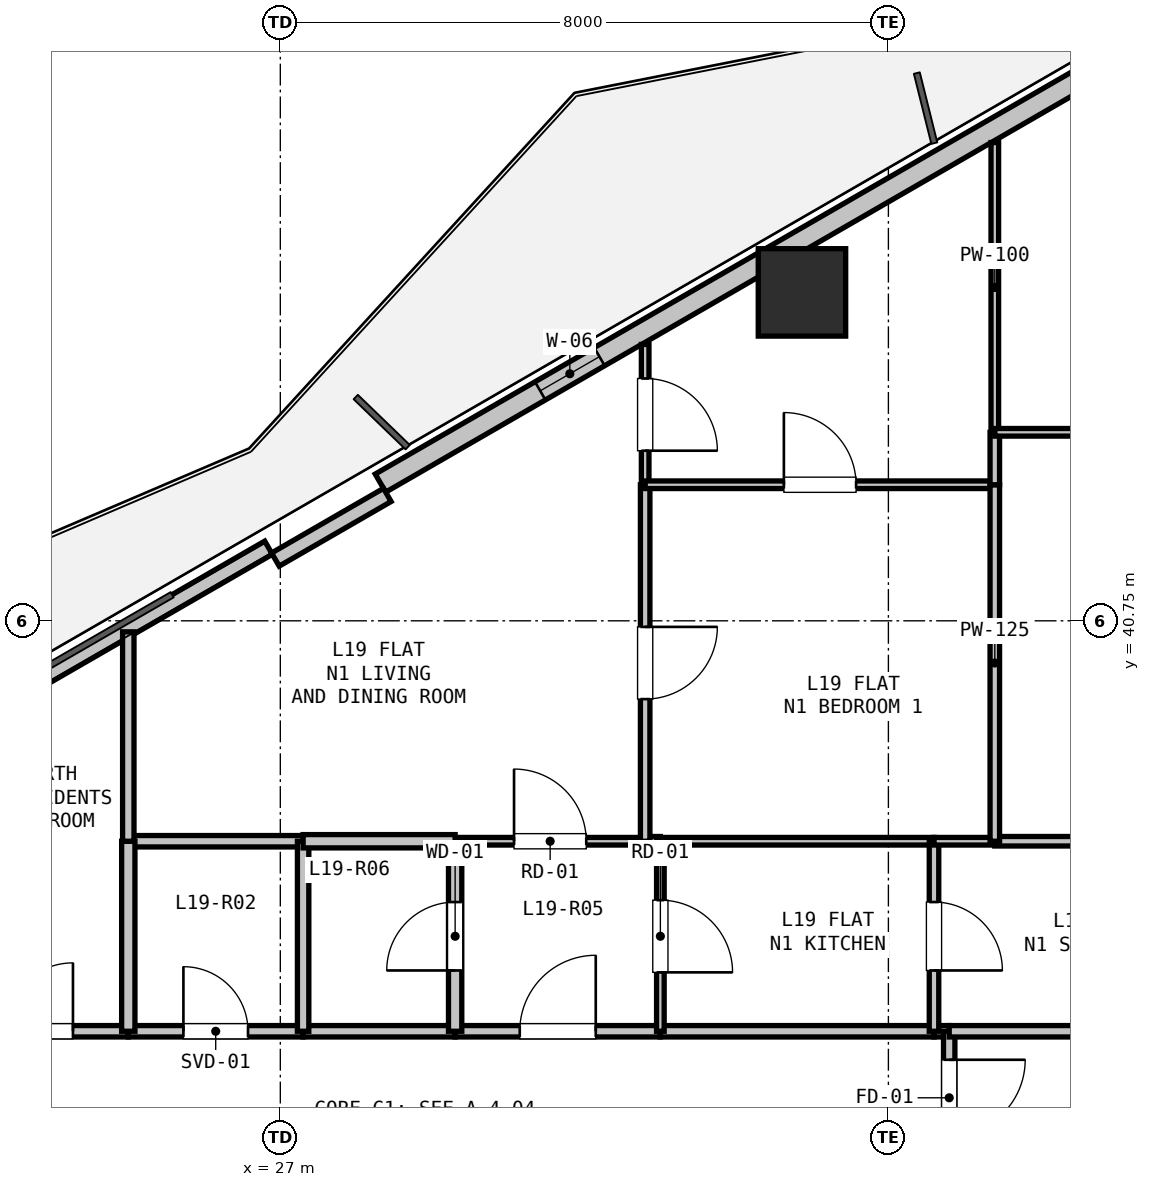
"""IFC4 building model, lengths in metres.
Left out: names, types, materials, properties, quantities, classifications, styles, units other than length and angle.
Written with IfcOpenShell. Run it as: python <this file> out.ifc"""

import sys

from ifc_helpers import new_model, si_unit, direction, frame, frame_2d, origin, origin_2d, place, context, subcontext, project, spatial, rectangle, hollow_rectangle, extrude, element, fill, save


model = new_model("IFC4")
c1 = context("Model", 3, precision=1e-05, world=origin(), true_north=direction((0.0, 1.0)))
c2 = subcontext(c1, "Body", "Model", "MODEL_VIEW")
j1 = project(units=[si_unit("LENGTHUNIT", "METRE"), si_unit("PLANEANGLEUNIT", "RADIAN")], contexts=[c1])
p1 = place(None, origin())
s1 = spatial("IfcSite", under=j1, at=p1, CompositionType="ELEMENT")
p2 = place(p1, origin())
s2 = spatial("IfcBuilding", under=s1, at=p2, CompositionType="ELEMENT")
p3 = place(p2, frame((0.0, 0.0, 73.5)))
s3 = spatial("IfcBuildingStorey", under=s2, at=p3, CompositionType="ELEMENT", Elevation=73.5)
p4 = place(p3, frame((33.863, 45.071, 0.0), z_axis=(0.0, 0.0, 1.0), x_axis=(1.0, 0.0, 0.0)))
e1 = element("IfcColumn", 1, at=p4, inside=s3, PredefinedType="COLUMN", context=c2, shape_type="SweptSolid", body=[
    extrude(hollow_rectangle(XDim=1.15, YDim=1.15, WallThickness=0.032, at=origin_2d()), origin(), (0.0, 0.0, 1.0), 3.3),
])
p5 = place(p3, frame((17.12, 36.097, 0.0), z_axis=(0.0, 0.0, 1.0), x_axis=(0.866027010039, 0.499997217876, 0.0)))
e2 = element("IfcWall", 2, at=p5, inside=s3, PredefinedType="PARAPET", context=c2, shape_type="SweptSolid", body=[
    extrude(rectangle(XDim=11.229, YDim=0.2, at=frame_2d((5.615, 0.0))), origin(), (0.0, 0.0, 1.0), 0.2),
])
p6 = place(p3, frame((28.317, 42.562, 0.0), z_axis=(0.0, 0.0, 1.0), x_axis=(0.866023023012, 0.500004123596, 0.0)))
e3 = element("IfcWall", 3, at=p6, inside=s3, PredefinedType="SOLIDWALL", context=c2, shape_type="SweptSolid", body=[
    extrude(rectangle(XDim=11.93, YDim=0.275, at=frame_2d((5.965, 0.0))), origin(), (0.0, 0.0, 1.0), 2.67),
])
p7 = place(p6, frame((2.427, 0.0, 0.9)))
e4 = element("IfcOpeningElement", 4, at=p7, cuts=e3, PredefinedType="OPENING", context=c2, shape_type="SweptSolid", body=[
    extrude(rectangle(XDim=0.9, YDim=1.4, at=frame_2d((0.45, 0.7))), frame((0.0, 0.147, 0.0), z_axis=(0.0, -1.0, 0.0), x_axis=(1.0, 0.0, 0.0)), (0.0, 0.0, 1.0), 0.295),
])
p8 = place(p3, frame((26.935, 41.556, 0.0), z_axis=(0.0, 0.0, 1.0), x_axis=(0.86605165483, 0.499954529098, 0.0)))
e5 = element("IfcWall", 5, at=p8, inside=s3, PredefinedType="PARAPET", context=c2, shape_type="SweptSolid", body=[
    extrude(rectangle(XDim=1.7, YDim=0.2, at=frame_2d((0.85, 0.0))), origin(), (0.0, 0.0, 1.0), 2.67),
])
p9 = place(p3, frame((19.8, 35.35, 0.0), z_axis=(0.0, 0.0, 1.0), x_axis=(1.0, 0.0, 0.0)))
e6 = element("IfcWall", 6, at=p9, inside=s3, PredefinedType="PARTITIONING", context=c2, shape_type="SweptSolid", body=[
    extrude(rectangle(XDim=5.2, YDim=0.15, at=frame_2d((2.6, 0.0))), origin(), (0.0, 0.0, 1.0), 3.05),
])
p10 = place(p9, frame((2.672, 0.0, 0.0)))
e7 = element("IfcOpeningElement", 7, at=p10, cuts=e6, PredefinedType="OPENING", context=c2, shape_type="SweptSolid", body=[
    extrude(rectangle(XDim=1.8, YDim=2.2, at=frame_2d((0.9, 1.1))), frame((0.0, 0.085, 0.0), z_axis=(0.0, -1.0, 0.0), x_axis=(1.0, 0.0, 0.0)), (0.0, 0.0, 1.0), 0.17),
])
p11 = place(p3, frame((25.0, 35.35, 0.0), z_axis=(0.0, 0.0, 1.0), x_axis=(1.0, 0.0, 0.0)))
e8 = element("IfcWall", 8, at=p11, inside=s3, PredefinedType="PARTITIONING", context=c2, shape_type="SweptSolid", body=[
    extrude(rectangle(XDim=2.3, YDim=0.15, at=frame_2d((1.15, 0.0))), origin(), (0.0, 0.0, 1.0), 3.05),
])
p12 = place(p11, frame((0.725, 0.0, 0.0)))
e9 = element("IfcOpeningElement", 9, at=p12, cuts=e8, PredefinedType="OPENING", context=c2, shape_type="SweptSolid", body=[
    extrude(rectangle(XDim=0.85, YDim=2.1, at=frame_2d((0.425, 1.05))), frame((0.0, 0.085, 0.0), z_axis=(0.0, -1.0, 0.0), x_axis=(1.0, 0.0, 0.0)), (0.0, 0.0, 1.0), 0.17),
])
p13 = place(p3, frame((27.3, 35.35, 0.0), z_axis=(0.0, 0.0, 1.0), x_axis=(1.0, 0.0, 0.0)))
e10 = element("IfcWall", 10, at=p13, inside=s3, PredefinedType="PARTITIONING", context=c2, shape_type="SweptSolid", body=[
    extrude(rectangle(XDim=2.0, YDim=0.15, at=frame_2d((1.0, 0.0))), origin(), (0.0, 0.0, 1.0), 3.05),
])
p14 = place(p3, frame((29.3, 35.35, 0.0), z_axis=(0.0, 0.0, 1.0), x_axis=(1.0, 0.0, 0.0)))
e11 = element("IfcWall", 11, at=p14, inside=s3, PredefinedType="PARTITIONING", context=c2, shape_type="SweptSolid", body=[
    extrude(rectangle(XDim=2.7, YDim=0.15, at=frame_2d((1.35, 0.0))), origin(), (0.0, 0.0, 1.0), 3.05),
])
p15 = place(p14, frame((0.85, 0.0, 0.0)))
e12 = element("IfcOpeningElement", 12, at=p15, cuts=e11, PredefinedType="OPENING", context=c2, shape_type="SweptSolid", body=[
    extrude(rectangle(XDim=1.0, YDim=2.15, at=frame_2d((0.5, 1.075))), frame((0.0, 0.085, 0.0), z_axis=(0.0, -1.0, 0.0), x_axis=(1.0, 0.0, 0.0)), (0.0, 0.0, 1.0), 0.17),
])
p16 = place(p3, frame((32.0, 35.35, 0.0), z_axis=(0.0, 0.0, 1.0), x_axis=(1.0, 0.0, 0.0)))
e13 = element("IfcWall", 13, at=p16, inside=s3, PredefinedType="PARTITIONING", context=c2, shape_type="SweptSolid", body=[
    extrude(rectangle(XDim=3.6, YDim=0.15, at=frame_2d((1.8, 0.0))), origin(), (0.0, 0.0, 1.0), 3.05),
])
p17 = place(p3, frame((35.6, 35.35, 0.0), z_axis=(0.0, 0.0, 1.0), x_axis=(1.0, 0.0, 0.0)))
e14 = element("IfcWall", 14, at=p17, inside=s3, PredefinedType="PARTITIONING", context=c2, shape_type="SweptSolid", body=[
    extrude(rectangle(XDim=0.2, YDim=0.15, at=frame_2d((0.1, 0.0))), origin(), (0.0, 0.0, 1.0), 3.05),
])
p18 = place(p3, frame((35.8, 35.35, 0.0), z_axis=(0.0, 0.0, 1.0), x_axis=(0.0, -1.0, 0.0)))
e15 = element("IfcWall", 15, at=p18, inside=s3, PredefinedType="PARTITIONING", context=c2, shape_type="SweptSolid", body=[
    extrude(rectangle(XDim=1.75, YDim=0.15, at=frame_2d((0.875, 0.0))), origin(), (0.0, 0.0, 1.0), 3.05),
])
p19 = place(p18, frame((0.375, 0.0, 0.0)))
e16 = element("IfcOpeningElement", 16, at=p19, cuts=e15, PredefinedType="OPENING", context=c2, shape_type="SweptSolid", body=[
    extrude(rectangle(XDim=1.0, YDim=2.15, at=frame_2d((0.5, 1.075))), frame((0.0, 0.085, 0.0), z_axis=(0.0, -1.0, 0.0), x_axis=(1.0, 0.0, 0.0)), (0.0, 0.0, 1.0), 0.17),
])
p20 = place(p3, frame((35.8, 35.35, 0.0), z_axis=(0.0, 0.0, 1.0), x_axis=(1.0, 0.0, 0.0)))
e17 = element("IfcWall", 17, at=p20, inside=s3, PredefinedType="PARTITIONING", context=c2, shape_type="SweptSolid", body=[
    extrude(rectangle(XDim=2.6, YDim=0.15, at=frame_2d((1.3, 0.0))), origin(), (0.0, 0.0, 1.0), 2.423),
])
p21 = place(p3, frame((29.3, 37.85, 0.0), z_axis=(0.0, 0.0, 1.0), x_axis=(1.0, 0.0, 0.0)))
e18 = element("IfcWall", 18, at=p21, inside=s3, PredefinedType="PARTITIONING", context=c2, shape_type="SweptSolid", body=[
    extrude(rectangle(XDim=2.5, YDim=0.1, at=frame_2d((1.25, 0.0))), origin(), (0.0, 0.0, 1.0), 3.05),
])
p22 = place(p21, frame((0.775, 0.0, 0.0)))
e19 = element("IfcOpeningElement", 19, at=p22, cuts=e18, PredefinedType="OPENING", context=c2, shape_type="SweptSolid", body=[
    extrude(rectangle(XDim=0.95, YDim=2.1, at=frame_2d((0.475, 1.05))), frame((0.0, 0.06, 0.0), z_axis=(0.0, -1.0, 0.0), x_axis=(1.0, 0.0, 0.0)), (0.0, 0.0, 1.0), 0.12),
])
p23 = place(p3, frame((31.8, 37.85, 0.0), z_axis=(0.0, 0.0, 1.0), x_axis=(1.0, 0.0, 0.0)))
e20 = element("IfcWall", 20, at=p23, inside=s3, PredefinedType="PARTITIONING", context=c2, shape_type="SweptSolid", body=[
    extrude(rectangle(XDim=0.2, YDim=0.125, at=frame_2d((0.1, 0.0))), origin(), (0.0, 0.0, 1.0), 3.05),
])
p24 = place(p3, frame((32.0, 37.85, 0.0), z_axis=(0.0, 0.0, 1.0), x_axis=(0.0, -1.0, 0.0)))
e21 = element("IfcWall", 21, at=p24, inside=s3, PredefinedType="PARTITIONING", context=c2, shape_type="SweptSolid", body=[
    extrude(rectangle(XDim=2.5, YDim=0.1, at=frame_2d((1.25, 0.0))), origin(), (0.0, 0.0, 1.0), 3.05),
])
p25 = place(p24, frame((0.775, 0.0, 0.0)))
e22 = element("IfcOpeningElement", 22, at=p25, cuts=e21, PredefinedType="OPENING", context=c2, shape_type="SweptSolid", body=[
    extrude(rectangle(XDim=0.95, YDim=2.1, at=frame_2d((0.475, 1.05))), frame((0.0, 0.06, 0.0), z_axis=(0.0, -1.0, 0.0), x_axis=(1.0, 0.0, 0.0)), (0.0, 0.0, 1.0), 0.12),
])
p26 = place(p3, frame((29.3, 35.35, 0.0), z_axis=(0.0, 0.0, 1.0), x_axis=(0.0, 1.0, 0.0)))
e23 = element("IfcWall", 23, at=p26, inside=s3, PredefinedType="PLUMBINGWALL", context=c2, shape_type="SweptSolid", body=[
    extrude(rectangle(XDim=2.5, YDim=0.175, at=frame_2d((1.25, 0.0))), origin(), (0.0, 0.0, 1.0), 3.05),
])
p27 = place(p26, frame((0.8, 0.0, 0.0)))
e24 = element("IfcOpeningElement", 24, at=p27, cuts=e23, PredefinedType="OPENING", context=c2, shape_type="SweptSolid", body=[
    extrude(rectangle(XDim=0.9, YDim=2.1, at=frame_2d((0.45, 1.05))), frame((0.0, 0.097, 0.0), z_axis=(0.0, -1.0, 0.0), x_axis=(1.0, 0.0, 0.0)), (0.0, 0.0, 1.0), 0.195),
])
p28 = place(p3, frame((25.0, 37.85, 0.0), z_axis=(0.0, 0.0, 1.0), x_axis=(1.0, 0.0, 0.0)))
e25 = element("IfcWall", 25, at=p28, inside=s3, PredefinedType="PARTITIONING", context=c2, shape_type="SweptSolid", body=[
    extrude(rectangle(XDim=2.3, YDim=0.15, at=frame_2d((1.15, 0.0))), origin(), (0.0, 0.0, 1.0), 3.05),
])
p29 = place(p3, frame((27.3, 37.85, 0.0), z_axis=(0.0, 0.0, 1.0), x_axis=(0.0, -1.0, 0.0)))
e26 = element("IfcWall", 26, at=p29, inside=s3, PredefinedType="PARTITIONING", context=c2, shape_type="SweptSolid", body=[
    extrude(rectangle(XDim=2.5, YDim=0.15, at=frame_2d((1.25, 0.0))), origin(), (0.0, 0.0, 1.0), 3.05),
])
p30 = place(p3, frame((25.0, 35.35, 0.0), z_axis=(0.0, 0.0, 1.0), x_axis=(0.0, 1.0, 0.0)))
e27 = element("IfcWall", 27, at=p30, inside=s3, PredefinedType="PLUMBINGWALL", context=c2, shape_type="SweptSolid", body=[
    extrude(rectangle(XDim=2.5, YDim=0.175, at=frame_2d((1.25, 0.0))), origin(), (0.0, 0.0, 1.0), 3.05),
])
p31 = place(p3, frame((27.3, 37.85, 0.0), z_axis=(0.0, 0.0, 1.0), x_axis=(1.0, 0.0, 0.0)))
e28 = element("IfcWall", 28, at=p31, inside=s3, PredefinedType="PLUMBINGWALL", context=c2, shape_type="SweptSolid", body=[
    extrude(rectangle(XDim=2.0, YDim=0.175, at=frame_2d((1.0, 0.0))), origin(), (0.0, 0.0, 1.0), 3.05),
])
p32 = place(p3, frame((32.0, 37.85, 0.0), z_axis=(0.0, 0.0, 1.0), x_axis=(1.0, 0.0, 0.0)))
e29 = element("IfcWall", 29, at=p32, inside=s3, PredefinedType="PARTITIONING", context=c2, shape_type="SweptSolid", body=[
    extrude(rectangle(XDim=3.6, YDim=0.1, at=frame_2d((1.8, 0.0))), origin(), (0.0, 0.0, 1.0), 3.05),
])
p33 = place(p3, frame((35.6, 37.85, 0.0), z_axis=(0.0, 0.0, 1.0), x_axis=(0.0, -1.0, 0.0)))
e30 = element("IfcWall", 30, at=p33, inside=s3, PredefinedType="PARTITIONING", context=c2, shape_type="SweptSolid", body=[
    extrude(rectangle(XDim=2.5, YDim=0.125, at=frame_2d((1.25, 0.0))), origin(), (0.0, 0.0, 1.0), 3.05),
])
p34 = place(p33, frame((0.8, 0.0, 0.0)))
e31 = element("IfcOpeningElement", 31, at=p34, cuts=e30, PredefinedType="OPENING", context=c2, shape_type="SweptSolid", body=[
    extrude(rectangle(XDim=0.9, YDim=2.1, at=frame_2d((0.45, 1.05))), frame((0.0, 0.073, 0.0), z_axis=(0.0, -1.0, 0.0), x_axis=(1.0, 0.0, 0.0)), (0.0, 0.0, 1.0), 0.145),
])
p35 = place(p3, frame((25.0, 40.605, 0.0), z_axis=(0.0, 0.0, 1.0), x_axis=(0.0, -1.0, 0.0)))
e32 = element("IfcWall", 32, at=p35, inside=s3, PredefinedType="PARTITIONING", context=c2, shape_type="SweptSolid", body=[
    extrude(rectangle(XDim=2.755, YDim=0.15, at=frame_2d((1.377, 0.0))), origin(), (0.0, 0.0, 1.0), 2.365),
])
p36 = place(p3, frame((35.6, 37.85, 0.0), z_axis=(0.0, 0.0, 1.0), x_axis=(1.0, 0.0, 0.0)))
e33 = element("IfcWall", 33, at=p36, inside=s3, PredefinedType="PARTITIONING", context=c2, shape_type="SweptSolid", body=[
    extrude(rectangle(XDim=0.8, YDim=0.1, at=frame_2d((0.4, 0.0))), origin(), (0.0, 0.0, 1.0), 3.05),
])
p37 = place(p3, frame((36.4, 37.85, 0.0), z_axis=(0.0, 0.0, 1.0), x_axis=(1.0, 0.0, 0.0)))
e34 = element("IfcWall", 34, at=p37, inside=s3, PredefinedType="PARTITIONING", context=c2, shape_type="SweptSolid", body=[
    extrude(rectangle(XDim=6.473, YDim=0.125, at=frame_2d((3.237, 0.0))), origin(), (0.0, 0.0, 1.0), 2.365),
])
p38 = place(p37, frame((2.762, 0.0, 0.0)))
e35 = element("IfcOpeningElement", 35, at=p38, cuts=e34, PredefinedType="OPENING", context=c2, shape_type="SweptSolid", body=[
    extrude(rectangle(XDim=0.95, YDim=2.1, at=frame_2d((0.475, 1.05))), frame((0.0, 0.073, 0.0), z_axis=(0.0, -1.0, 0.0), x_axis=(1.0, 0.0, 0.0)), (0.0, 0.0, 1.0), 0.145),
])
p39 = place(p3, frame((31.8, 44.386, 0.0), z_axis=(0.0, 0.0, 1.0), x_axis=(0.0, -1.0, 0.0)))
e36 = element("IfcWall", 36, at=p39, inside=s3, PredefinedType="PARTITIONING", context=c2, shape_type="SweptSolid", body=[
    extrude(rectangle(XDim=1.846, YDim=0.1, at=frame_2d((0.923, 0.0))), origin(), (0.0, 0.0, 1.0), 2.365),
])
p40 = place(p39, frame((0.448, 0.0, 0.0)))
e37 = element("IfcOpeningElement", 37, at=p40, cuts=e36, PredefinedType="OPENING", context=c2, shape_type="SweptSolid", body=[
    extrude(rectangle(XDim=0.95, YDim=2.1, at=frame_2d((0.475, 1.05))), frame((0.0, 0.06, 0.0), z_axis=(0.0, -1.0, 0.0), x_axis=(1.0, 0.0, 0.0)), (0.0, 0.0, 1.0), 0.12),
])
p41 = place(p3, frame((31.8, 42.54, 0.0), z_axis=(0.0, 0.0, 1.0), x_axis=(0.0, -1.0, 0.0)))
e38 = element("IfcWall", 38, at=p41, inside=s3, PredefinedType="PARTITIONING", context=c2, shape_type="SweptSolid", body=[
    extrude(rectangle(XDim=4.69, YDim=0.125, at=frame_2d((2.345, 0.0))), origin(), (0.0, 0.0, 1.0), 3.05),
])
p42 = place(p41, frame((1.87, 0.0, 0.0)))
e39 = element("IfcOpeningElement", 39, at=p42, cuts=e38, PredefinedType="OPENING", context=c2, shape_type="SweptSolid", body=[
    extrude(rectangle(XDim=0.95, YDim=2.1, at=frame_2d((0.475, 1.05))), frame((0.0, 0.073, 0.0), z_axis=(0.0, -1.0, 0.0), x_axis=(1.0, 0.0, 0.0)), (0.0, 0.0, 1.0), 0.145),
])
p43 = place(p3, frame((31.8, 42.54, 0.0), z_axis=(0.0, 0.0, 1.0), x_axis=(1.0, 0.0, 0.0)))
e40 = element("IfcWall", 40, at=p43, inside=s3, PredefinedType="PARTITIONING", context=c2, shape_type="SweptSolid", body=[
    extrude(rectangle(XDim=4.6, YDim=0.1, at=frame_2d((2.3, 0.0))), origin(), (0.0, 0.0, 1.0), 3.05),
])
p44 = place(p43, frame((1.825, 0.0, 0.0)))
e41 = element("IfcOpeningElement", 41, at=p44, cuts=e40, PredefinedType="OPENING", context=c2, shape_type="SweptSolid", body=[
    extrude(rectangle(XDim=0.95, YDim=2.1, at=frame_2d((0.475, 1.05))), frame((0.0, 0.06, 0.0), z_axis=(0.0, -1.0, 0.0), x_axis=(1.0, 0.0, 0.0)), (0.0, 0.0, 1.0), 0.12),
])
p45 = place(p3, frame((36.4, 42.54, 0.0), z_axis=(0.0, 0.0, 1.0), x_axis=(0.0, -1.0, 0.0)))
e42 = element("IfcWall", 42, at=p45, inside=s3, PredefinedType="PARTITIONING", context=c2, shape_type="SweptSolid", body=[
    extrude(rectangle(XDim=4.69, YDim=0.125, at=frame_2d((2.345, 0.0))), origin(), (0.0, 0.0, 1.0), 3.05),
])
p46 = place(p3, frame((36.4, 47.042, 0.0), z_axis=(0.0, 0.0, 1.0), x_axis=(0.0, -1.0, 0.0)))
e43 = element("IfcWall", 43, at=p46, inside=s3, PredefinedType="PARTITIONING", context=c2, shape_type="SweptSolid", body=[
    extrude(rectangle(XDim=3.812, YDim=0.1, at=frame_2d((1.906, 0.0))), origin(), (0.0, 0.0, 1.0), 2.66),
])
p47 = place(p3, frame((36.4, 43.23, 0.0), z_axis=(0.0, 0.0, 1.0), x_axis=(0.0, -1.0, 0.0)))
e44 = element("IfcWall", 44, at=p47, inside=s3, PredefinedType="PARTITIONING", context=c2, shape_type="SweptSolid", body=[
    extrude(rectangle(XDim=0.69, YDim=0.125, at=frame_2d((0.345, 0.0))), origin(), (0.0, 0.0, 1.0), 3.05),
])
p48 = place(p3, frame((36.4, 43.23, 0.0), z_axis=(0.0, 0.0, 1.0), x_axis=(1.0, 0.0, 0.0)))
e45 = element("IfcWall", 45, at=p48, inside=s3, PredefinedType="PARTITIONING", context=c2, shape_type="SweptSolid", body=[
    extrude(rectangle(XDim=6.473, YDim=0.1, at=frame_2d((3.237, 0.0))), origin(), (0.0, 0.0, 1.0), 2.423),
])
p49 = place(p48, frame((2.762, 0.0, 0.0)))
e46 = element("IfcOpeningElement", 46, at=p49, cuts=e45, PredefinedType="OPENING", context=c2, shape_type="SweptSolid", body=[
    extrude(rectangle(XDim=0.95, YDim=2.1, at=frame_2d((0.475, 1.05))), frame((0.0, 0.06, 0.0), z_axis=(0.0, -1.0, 0.0), x_axis=(1.0, 0.0, 0.0)), (0.0, 0.0, 1.0), 0.12),
])
p50 = place(p7, origin())
e47 = element("IfcWindow", 47, at=p50, inside=s3, PartitioningType="SINGLE_PANEL", PredefinedType="WINDOW", context=c2, shape_type="SweptSolid", body=[
    extrude(rectangle(XDim=0.9, YDim=1.4, at=frame_2d((0.45, 0.7))), frame((0.0, 0.03, 0.0), z_axis=(0.0, -1.0, 0.0), x_axis=(1.0, 0.0, 0.0)), (0.0, 0.0, 1.0), 0.06),
])
fill(e4, e47)
p51 = place(p19, origin())
e48 = element("IfcDoor", 48, at=p51, inside=s3, OperationType="SINGLE_SWING_LEFT", PredefinedType="DOOR", context=c2, shape_type="SweptSolid", body=[
    extrude(rectangle(XDim=1.0, YDim=2.15, at=frame_2d((0.5, 1.075))), frame((0.0, 0.025, 0.0), z_axis=(0.0, -1.0, 0.0), x_axis=(1.0, 0.0, 0.0)), (0.0, 0.0, 1.0), 0.05),
])
fill(e16, e48)
p52 = place(p15, origin())
e49 = element("IfcDoor", 49, at=p52, inside=s3, OperationType="SINGLE_SWING_RIGHT", PredefinedType="DOOR", context=c2, shape_type="SweptSolid", body=[
    extrude(rectangle(XDim=1.0, YDim=2.15, at=frame_2d((0.5, 1.075))), frame((0.0, 0.025, 0.0), z_axis=(0.0, -1.0, 0.0), x_axis=(1.0, 0.0, 0.0)), (0.0, 0.0, 1.0), 0.05),
])
fill(e12, e49)
p53 = place(p12, origin())
e50 = element("IfcDoor", 50, at=p53, inside=s3, OperationType="SINGLE_SWING_LEFT", PredefinedType="DOOR", context=c2, shape_type="SweptSolid", body=[
    extrude(rectangle(XDim=0.85, YDim=2.1, at=frame_2d((0.425, 1.05))), frame((0.0, 0.025, 0.0), z_axis=(0.0, -1.0, 0.0), x_axis=(1.0, 0.0, 0.0)), (0.0, 0.0, 1.0), 0.05),
])
fill(e9, e50)
p54 = place(p10, origin())
e51 = element("IfcDoor", 51, at=p54, inside=s3, OperationType="DOUBLE_DOOR_SINGLE_SWING", PredefinedType="DOOR", context=c2, shape_type="SweptSolid", body=[
    extrude(rectangle(XDim=1.8, YDim=2.2, at=frame_2d((0.9, 1.1))), frame((0.0, 0.025, 0.0), z_axis=(0.0, -1.0, 0.0), x_axis=(1.0, 0.0, 0.0)), (0.0, 0.0, 1.0), 0.05),
])
fill(e7, e51)
p55 = place(p27, origin())
e52 = element("IfcDoor", 52, at=p55, inside=s3, OperationType="SINGLE_SWING_LEFT", PredefinedType="DOOR", context=c2, shape_type="SweptSolid", body=[
    extrude(rectangle(XDim=0.9, YDim=2.1, at=frame_2d((0.45, 1.05))), frame((0.0, 0.025, 0.0), z_axis=(0.0, -1.0, 0.0), x_axis=(1.0, 0.0, 0.0)), (0.0, 0.0, 1.0), 0.05),
])
fill(e24, e52)
p56 = place(p25, origin())
e53 = element("IfcDoor", 53, at=p56, inside=s3, OperationType="SINGLE_SWING_RIGHT", PredefinedType="DOOR", context=c2, shape_type="SweptSolid", body=[
    extrude(rectangle(XDim=0.95, YDim=2.1, at=frame_2d((0.475, 1.05))), frame((0.0, 0.025, 0.0), z_axis=(0.0, -1.0, 0.0), x_axis=(1.0, 0.0, 0.0)), (0.0, 0.0, 1.0), 0.05),
])
fill(e22, e53)
p57 = place(p22, origin())
e54 = element("IfcDoor", 54, at=p57, inside=s3, OperationType="SINGLE_SWING_LEFT", PredefinedType="DOOR", context=c2, shape_type="SweptSolid", body=[
    extrude(rectangle(XDim=0.95, YDim=2.1, at=frame_2d((0.475, 1.05))), frame((0.0, 0.025, 0.0), z_axis=(0.0, -1.0, 0.0), x_axis=(1.0, 0.0, 0.0)), (0.0, 0.0, 1.0), 0.05),
])
fill(e19, e54)
p58 = place(p42, origin())
e55 = element("IfcDoor", 55, at=p58, inside=s3, OperationType="SINGLE_SWING_LEFT", PredefinedType="DOOR", context=c2, shape_type="SweptSolid", body=[
    extrude(rectangle(XDim=0.95, YDim=2.1, at=frame_2d((0.475, 1.05))), frame((0.0, 0.025, 0.0), z_axis=(0.0, -1.0, 0.0), x_axis=(1.0, 0.0, 0.0)), (0.0, 0.0, 1.0), 0.05),
])
fill(e39, e55)
p59 = place(p40, origin())
e56 = element("IfcDoor", 56, at=p59, inside=s3, OperationType="SINGLE_SWING_RIGHT", PredefinedType="DOOR", context=c2, shape_type="SweptSolid", body=[
    extrude(rectangle(XDim=0.95, YDim=2.1, at=frame_2d((0.475, 1.05))), frame((0.0, 0.025, 0.0), z_axis=(0.0, -1.0, 0.0), x_axis=(1.0, 0.0, 0.0)), (0.0, 0.0, 1.0), 0.05),
])
fill(e37, e56)
p60 = place(p44, origin())
e57 = element("IfcDoor", 57, at=p60, inside=s3, OperationType="SINGLE_SWING_LEFT", PredefinedType="DOOR", context=c2, shape_type="SweptSolid", body=[
    extrude(rectangle(XDim=0.95, YDim=2.1, at=frame_2d((0.475, 1.05))), frame((0.0, 0.025, 0.0), z_axis=(0.0, -1.0, 0.0), x_axis=(1.0, 0.0, 0.0)), (0.0, 0.0, 1.0), 0.05),
])
fill(e41, e57)
p61 = place(p34, origin())
e58 = element("IfcDoor", 58, at=p61, inside=s3, OperationType="SINGLE_SWING_RIGHT", PredefinedType="DOOR", context=c2, shape_type="SweptSolid", body=[
    extrude(rectangle(XDim=0.9, YDim=2.1, at=frame_2d((0.45, 1.05))), frame((0.0, 0.025, 0.0), z_axis=(0.0, -1.0, 0.0), x_axis=(1.0, 0.0, 0.0)), (0.0, 0.0, 1.0), 0.05),
])
fill(e31, e58)
save(model, sys.argv[1])
